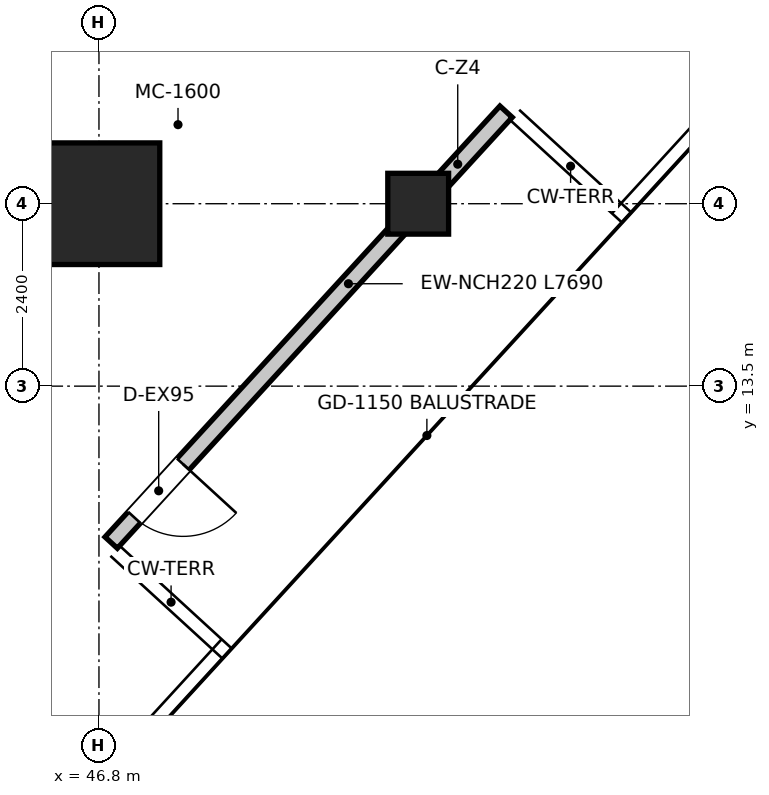
"""IFC4 building model, lengths in metres.
Left out: names, types, materials, properties, quantities, classifications, styles, units other than length and angle.
Written with IfcOpenShell. Run it as: python <this file> out.ifc"""

import sys

from ifc_helpers import new_model, si_unit, direction, frame, frame_2d, origin, origin_2d, place, context, subcontext, project, spatial, rectangle, extrude, source, transform, mapped, element, fill, save


model = new_model("IFC4")
c1 = context("Model", 3, precision=1e-05, world=origin(), true_north=direction((0.0, 1.0)))
c2 = subcontext(c1, "Body", "Model", "MODEL_VIEW")
j1 = project(units=[si_unit("LENGTHUNIT", "METRE"), si_unit("PLANEANGLEUNIT", "RADIAN")], contexts=[c1])
p1 = place(None, origin())
s1 = spatial("IfcSite", under=j1, at=p1, CompositionType="ELEMENT")
p2 = place(p1, origin())
s2 = spatial("IfcBuilding", under=s1, at=p2, CompositionType="ELEMENT")
p3 = place(p2, frame((0.0, 0.0, 227.05)))
s3 = spatial("IfcBuildingStorey", under=s2, at=p3, CompositionType="ELEMENT", Elevation=227.05)
m1 = source(origin(), c2, "Body", "SweptSolid", [
    extrude(rectangle(XDim=1.6, YDim=1.6, at=origin_2d()), origin(), (0.0, 0.0, 1.0), 3.95),
])
p4 = place(p3, frame((46.8, 15.9, 0.0), z_axis=(0.0, 0.0, 1.0), x_axis=(1.0, 0.0, 0.0)))
e1 = element("IfcColumn", 1, at=p4, inside=s3, PredefinedType="USERDEFINED", context=c2, shape_type="MappedRepresentation", body=[
    mapped(m1, transform((0.0, 0.0, 0.0), x_axis=(1.0, 0.0, 0.0), y_axis=(0.0, 1.0, 0.0), z_axis=(0.0, 0.0, 1.0), scale=1.0)),
])
m2 = source(origin(), c2, "Body", "SweptSolid", [
    extrude(rectangle(XDim=0.8, YDim=0.8, at=origin_2d()), origin(), (0.0, 0.0, 1.0), 3.95),
])
p5 = place(p3, frame((51.0, 15.9, 0.0), z_axis=(0.0, 0.0, 1.0), x_axis=(1.0, 0.0, 0.0)))
e2 = element("IfcColumn", 2, at=p5, inside=s3, PredefinedType="COLUMN", context=c2, shape_type="MappedRepresentation", body=[
    mapped(m2, transform((0.0, 0.0, 0.0), x_axis=(1.0, 0.0, 0.0), y_axis=(0.0, 1.0, 0.0), z_axis=(0.0, 0.0, 1.0), scale=1.0)),
])
p6 = place(p3, frame((52.156, 17.111, 0.0), z_axis=(0.0, 0.0, 1.0), x_axis=(-0.675590917682, -0.737276686153, 0.0)))
e3 = element("IfcWall", 3, at=p6, inside=s3, PredefinedType="ELEMENTEDWALL", context=c2, shape_type="SweptSolid", body=[
    extrude(rectangle(XDim=7.69, YDim=0.22, at=frame_2d((3.845, 0.0))), origin(), (0.0, 0.0, 1.0), 3.18),
])
p7 = place(p6, frame((6.29, 0.0, 0.0)))
e4 = element("IfcOpeningElement", 4, at=p7, cuts=e3, PredefinedType="OPENING", context=c2, shape_type="SweptSolid", body=[
    extrude(rectangle(XDim=0.95, YDim=2.1, at=frame_2d((0.475, 1.05))), frame((0.0, 0.12, 0.0), z_axis=(0.0, -1.0, 0.0), x_axis=(1.0, 0.0, 0.0)), (0.0, 0.0, 1.0), 0.24),
])
p8 = place(p7, origin())
e5 = element("IfcDoor", 5, at=p8, inside=s3, OperationType="SINGLE_SWING_LEFT", PredefinedType="DOOR", context=c2, shape_type="SweptSolid", body=[
    extrude(rectangle(XDim=0.95, YDim=2.1, at=frame_2d((0.475, 1.05))), frame((0.0, 0.025, 0.0), z_axis=(0.0, -1.0, 0.0), x_axis=(1.0, 0.0, 0.0)), (0.0, 0.0, 1.0), 0.05),
])
fill(e4, e5)
save(model, sys.argv[1])
